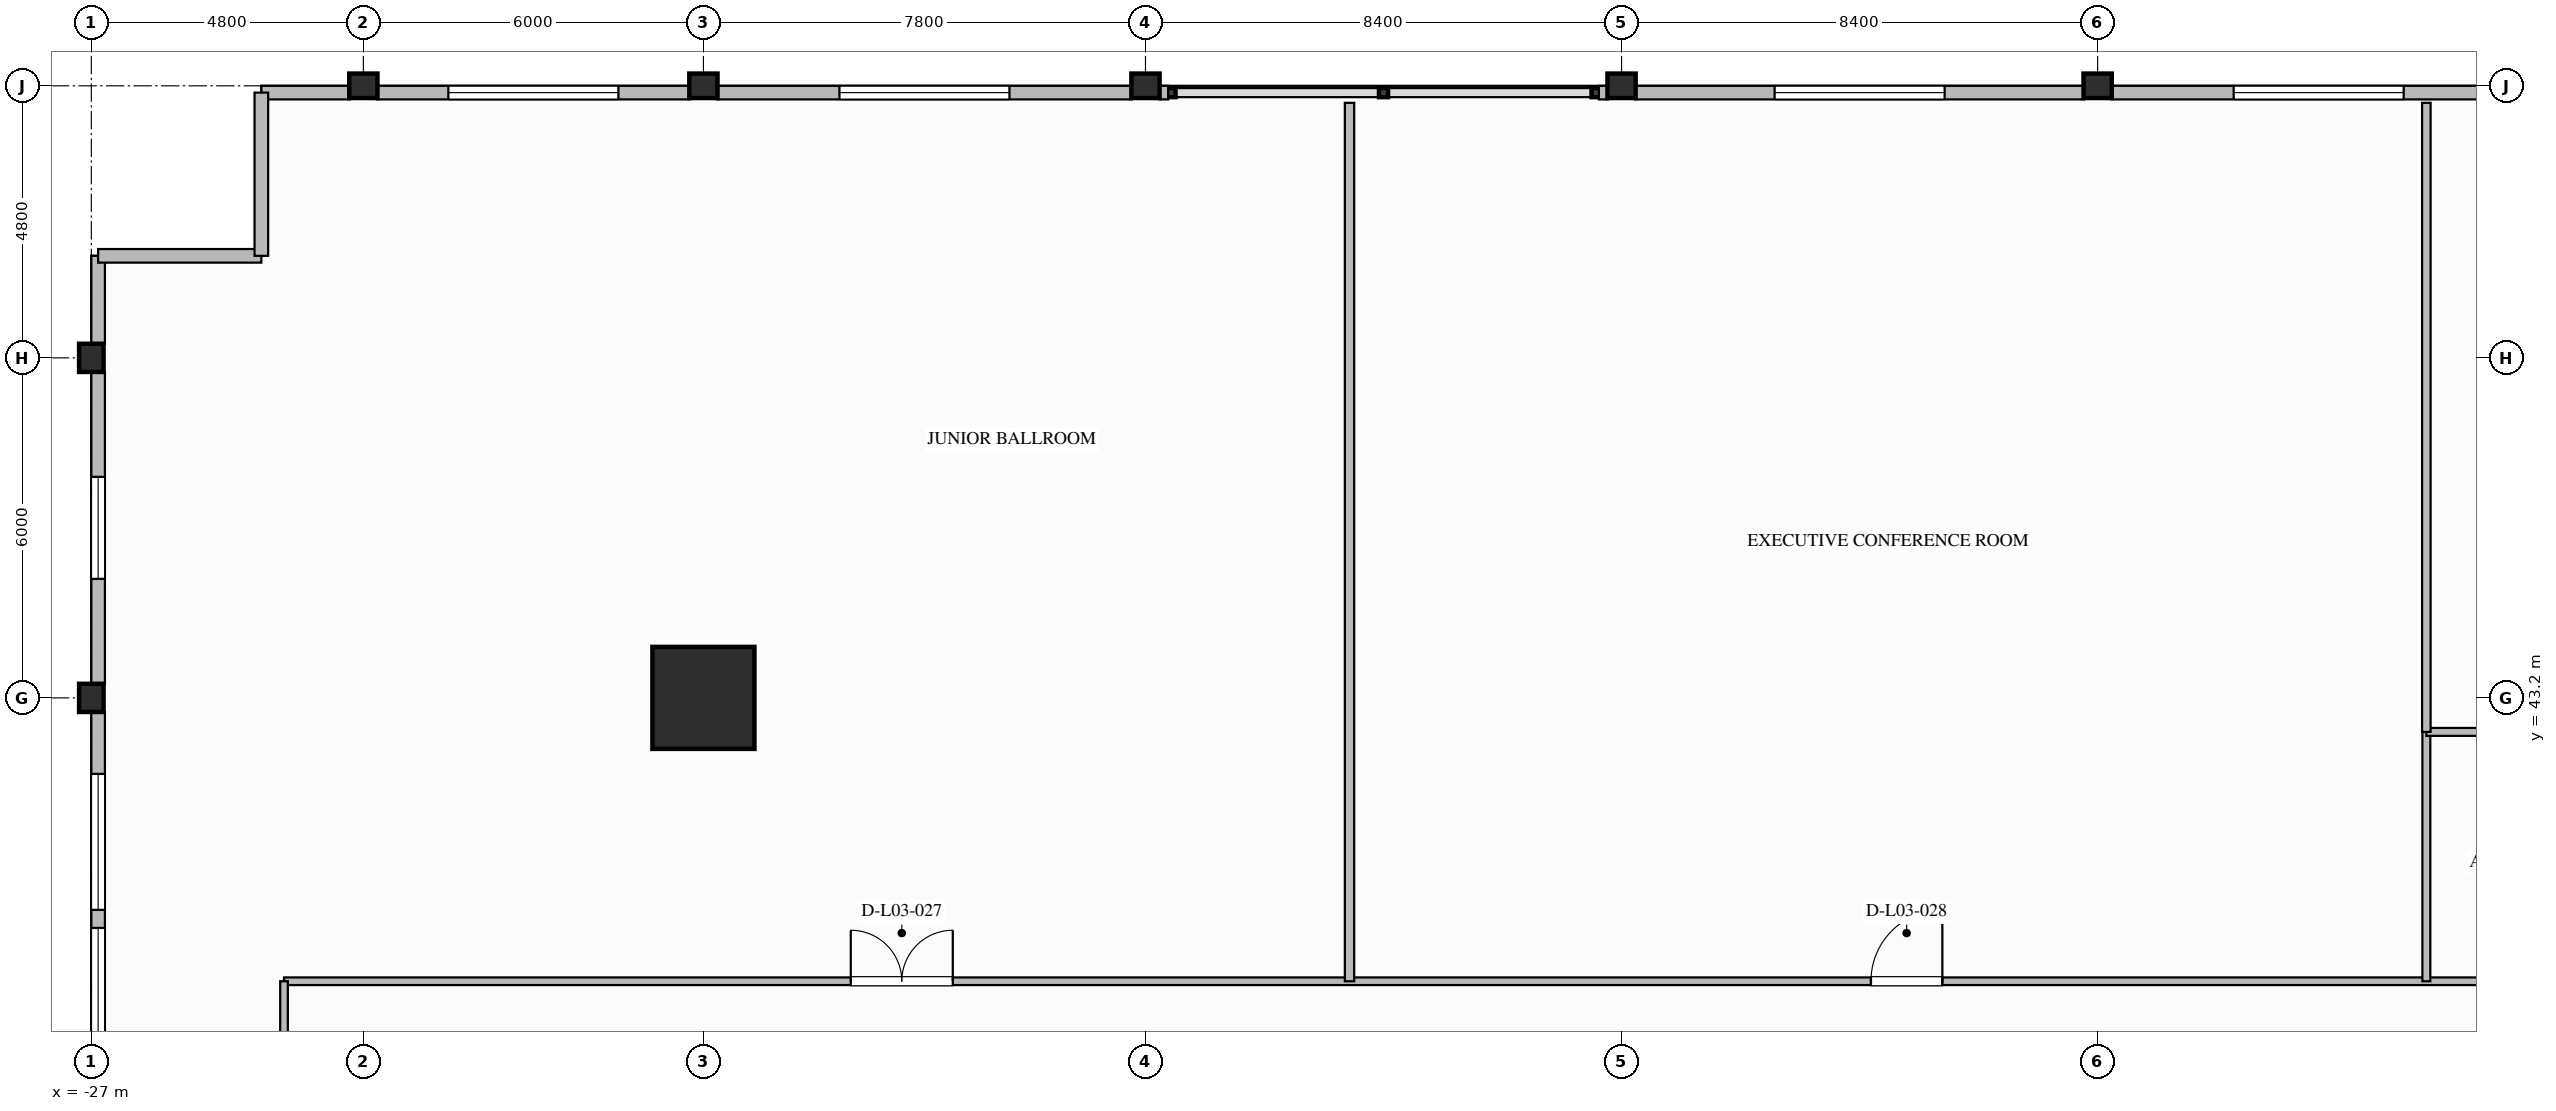
"""IFC4 building model, lengths in metres.
Left out: names, types, materials, properties, quantities, classifications, styles, units other than length and angle.
Written with IfcOpenShell. Run it as: python <this file> out.ifc"""

import sys

from ifc_helpers import new_model, si_unit, direction, frame, frame_2d, origin, origin_2d, place, context, subcontext, project, spatial, rectangle, i_section, extrude, element, fill, save


model = new_model("IFC4")
c1 = context("Model", 3, precision=1e-05, world=origin(), true_north=direction((0.0, 1.0)))
c2 = subcontext(c1, "Body", "Model", "MODEL_VIEW")
j1 = project(units=[si_unit("LENGTHUNIT", "METRE"), si_unit("PLANEANGLEUNIT", "RADIAN")], contexts=[c1])
p1 = place(None, origin())
s1 = spatial("IfcSite", under=j1, at=p1, CompositionType="ELEMENT")
p2 = place(p1, origin())
s2 = spatial("IfcBuilding", under=s1, at=p2, CompositionType="ELEMENT")
p3 = place(p2, frame((0.0, 0.0, 17.2)))
s3 = spatial("IfcBuildingStorey", under=s2, at=p3, CompositionType="ELEMENT", Elevation=17.2)
p4 = place(p3, frame((-16.2, 43.2, 0.0), z_axis=(0.0, 0.0, 1.0), x_axis=(1.0, 0.0, 0.0)))
e1 = element("IfcColumn", 1, at=p4, inside=s3, PredefinedType="COLUMN", context=c2, shape_type="SweptSolid", body=[
    extrude(rectangle(XDim=1.8, YDim=1.8, at=origin_2d()), origin(), (0.0, 0.0, 1.0), 5.2),
])
for number, where, z_axis, x_axis in (
    (2, (-27.0, 43.2, 0.0), (0.0, 0.0, 1.0), (1.0, 0.0, 0.0)),
    (3, (-27.0, 49.2, 0.0), (0.0, 0.0, 1.0), (1.0, 0.0, 0.0)),
    (4, (-22.2, 54.0, 0.0), (0.0, 0.0, 1.0), (0.0, 1.0, 0.0)),
    (5, (-16.2, 54.0, 0.0), (0.0, 0.0, 1.0), (0.0, 1.0, 0.0)),
    (6, (-8.4, 54.0, 0.0), (0.0, 0.0, 1.0), (0.0, 1.0, 0.0)),
    (7, (0.0, 54.0, 0.0), (0.0, 0.0, 1.0), (0.0, 1.0, 0.0)),
    (8, (8.4, 54.0, 0.0), (0.0, 0.0, 1.0), (0.0, 1.0, 0.0)),
):
    element("IfcColumn", number, at=place(p3, frame(where, z_axis=z_axis, x_axis=x_axis)), inside=s3, PredefinedType="COLUMN", context=c2, shape_type="SweptSolid", body=[
        extrude(i_section(OverallWidth=0.432, OverallDepth=0.498, WebThickness=0.056, FlangeThickness=0.089, FilletRadius=0.03, at=origin_2d()), origin(), (0.0, 0.0, 1.0), 5.2),
    ])
p5 = place(p3, frame((-26.88, 35.641, 0.0), z_axis=(0.0, 0.0, 1.0), x_axis=(0.0, 1.0, 0.0)))
e9 = element("IfcWall", 9, at=p5, inside=s3, PredefinedType="STANDARD", context=c2, shape_type="SweptSolid", body=[
    extrude(rectangle(XDim=7.318, YDim=0.24, at=frame_2d((3.659, 0.0))), origin(), (0.0, 0.0, 1.0), 4.205),
])
p6 = place(p5, frame((1.1, 0.0, 0.7)))
e10 = element("IfcOpeningElement", 10, at=p6, cuts=e9, PredefinedType="OPENING", context=c2, shape_type="SweptSolid", body=[
    extrude(rectangle(XDim=2.4, YDim=2.4, at=frame_2d((1.2, 1.2))), frame((0.0, 0.13, 0.0), z_axis=(0.0, -1.0, 0.0), x_axis=(1.0, 0.0, 0.0)), (0.0, 0.0, 1.0), 0.26),
])
p7 = place(p5, frame((3.818, 0.0, 0.7)))
e11 = element("IfcOpeningElement", 11, at=p7, cuts=e9, PredefinedType="OPENING", context=c2, shape_type="SweptSolid", body=[
    extrude(rectangle(XDim=2.4, YDim=2.4, at=frame_2d((1.2, 1.2))), frame((0.0, 0.13, 0.0), z_axis=(0.0, -1.0, 0.0), x_axis=(1.0, 0.0, 0.0)), (0.0, 0.0, 1.0), 0.26),
])
p8 = place(p3, frame((-26.88, 43.441, 0.0), z_axis=(0.0, 0.0, 1.0), x_axis=(0.0, 1.0, 0.0)))
e12 = element("IfcWall", 12, at=p8, inside=s3, PredefinedType="STANDARD", context=c2, shape_type="SweptSolid", body=[
    extrude(rectangle(XDim=5.518, YDim=0.24, at=frame_2d((2.759, 0.0))), origin(), (0.0, 0.0, 1.0), 4.205),
])
p9 = place(p8, frame((1.859, 0.0, 0.7)))
e13 = element("IfcOpeningElement", 13, at=p9, cuts=e12, PredefinedType="OPENING", context=c2, shape_type="SweptSolid", body=[
    extrude(rectangle(XDim=1.8, YDim=2.2, at=frame_2d((0.9, 1.1))), frame((0.0, 0.13, 0.0), z_axis=(0.0, -1.0, 0.0), x_axis=(1.0, 0.0, 0.0)), (0.0, 0.0, 1.0), 0.26),
])
for number, where, z_axis, x_axis in (
    (14, (-26.88, 49.441, 0.0), (0.0, 0.0, 1.0), (0.0, 1.0, 0.0)),
    (15, (-24.0, 53.88, 0.0), (0.0, 0.0, 1.0), (1.0, 0.0, 0.0)),
):
    element("IfcWall", number, at=place(p3, frame(where, z_axis=z_axis, x_axis=x_axis)), inside=s3, PredefinedType="STANDARD", context=c2, shape_type="SweptSolid", body=[
        extrude(rectangle(XDim=1.559, YDim=0.24, at=frame_2d((0.78, 0.0))), origin(), (0.0, 0.0, 1.0), 4.9),
    ])
p10 = place(p3, frame((-21.959, 53.88, 0.0), z_axis=(0.0, 0.0, 1.0), x_axis=(1.0, 0.0, 0.0)))
e16 = element("IfcWall", 16, at=p10, inside=s3, PredefinedType="STANDARD", context=c2, shape_type="SweptSolid", body=[
    extrude(rectangle(XDim=5.518, YDim=0.24, at=frame_2d((2.759, 0.0))), origin(), (0.0, 0.0, 1.0), 4.205),
])
p11 = place(p10, frame((1.259, 0.0, 0.65)))
e17 = element("IfcOpeningElement", 17, at=p11, cuts=e16, PredefinedType="OPENING", context=c2, shape_type="SweptSolid", body=[
    extrude(rectangle(XDim=3.0, YDim=2.2, at=frame_2d((1.5, 1.1))), frame((0.0, 0.13, 0.0), z_axis=(0.0, -1.0, 0.0), x_axis=(1.0, 0.0, 0.0)), (0.0, 0.0, 1.0), 0.26),
])
p12 = place(p3, frame((-15.959, 53.88, 0.0), z_axis=(0.0, 0.0, 1.0), x_axis=(1.0, 0.0, 0.0)))
e18 = element("IfcWall", 18, at=p12, inside=s3, PredefinedType="STANDARD", context=c2, shape_type="SweptSolid", body=[
    extrude(rectangle(XDim=7.318, YDim=0.24, at=frame_2d((3.659, 0.0))), origin(), (0.0, 0.0, 1.0), 4.205),
])
p13 = place(p12, frame((2.159, 0.0, 0.65)))
e19 = element("IfcOpeningElement", 19, at=p13, cuts=e18, PredefinedType="OPENING", context=c2, shape_type="SweptSolid", body=[
    extrude(rectangle(XDim=3.0, YDim=2.2, at=frame_2d((1.5, 1.1))), frame((0.0, 0.13, 0.0), z_axis=(0.0, -1.0, 0.0), x_axis=(1.0, 0.0, 0.0)), (0.0, 0.0, 1.0), 0.26),
])
p14 = place(p3, frame((-8.159, 53.88, 0.0), z_axis=(0.0, 0.0, 1.0), x_axis=(1.0, 0.0, 0.0)))
e20 = element("IfcWall", 20, at=p14, inside=s3, PredefinedType="STANDARD", context=c2, shape_type="SweptSolid", body=[
    extrude(rectangle(XDim=0.159, YDim=0.24, at=frame_2d((0.08, 0.0))), origin(), (0.0, 0.0, 1.0), 4.9),
])
p15 = place(p3, frame((-0.4, 53.88, 0.0), z_axis=(0.0, 0.0, 1.0), x_axis=(1.0, 0.0, 0.0)))
e21 = element("IfcWall", 21, at=p15, inside=s3, PredefinedType="STANDARD", context=c2, shape_type="SweptSolid", body=[
    extrude(rectangle(XDim=0.159, YDim=0.24, at=frame_2d((0.08, 0.0))), origin(), (0.0, 0.0, 1.0), 4.9),
])
p16 = place(p3, frame((0.241, 53.88, 0.0), z_axis=(0.0, 0.0, 1.0), x_axis=(1.0, 0.0, 0.0)))
e22 = element("IfcWall", 22, at=p16, inside=s3, PredefinedType="STANDARD", context=c2, shape_type="SweptSolid", body=[
    extrude(rectangle(XDim=7.918, YDim=0.24, at=frame_2d((3.959, 0.0))), origin(), (0.0, 0.0, 1.0), 4.205),
])
p17 = place(p16, frame((2.459, 0.0, 0.65)))
e23 = element("IfcOpeningElement", 23, at=p17, cuts=e22, PredefinedType="OPENING", context=c2, shape_type="SweptSolid", body=[
    extrude(rectangle(XDim=3.0, YDim=2.2, at=frame_2d((1.5, 1.1))), frame((0.0, 0.13, 0.0), z_axis=(0.0, -1.0, 0.0), x_axis=(1.0, 0.0, 0.0)), (0.0, 0.0, 1.0), 0.26),
])
p18 = place(p3, frame((8.641, 53.88, 0.0), z_axis=(0.0, 0.0, 1.0), x_axis=(1.0, 0.0, 0.0)))
e24 = element("IfcWall", 24, at=p18, inside=s3, PredefinedType="STANDARD", context=c2, shape_type="SweptSolid", body=[
    extrude(rectangle(XDim=7.318, YDim=0.24, at=frame_2d((3.659, 0.0))), origin(), (0.0, 0.0, 1.0), 4.205),
])
p19 = place(p18, frame((2.159, 0.0, 0.65)))
e25 = element("IfcOpeningElement", 25, at=p19, cuts=e24, PredefinedType="OPENING", context=c2, shape_type="SweptSolid", body=[
    extrude(rectangle(XDim=3.0, YDim=2.2, at=frame_2d((1.5, 1.1))), frame((0.0, 0.13, 0.0), z_axis=(0.0, -1.0, 0.0), x_axis=(1.0, 0.0, 0.0)), (0.0, 0.0, 1.0), 0.26),
])
for number, where, z_axis, x_axis in (
    (26, (-26.88, 51.0, 0.0), (0.0, 0.0, 1.0), (1.0, 0.0, 0.0)),
    (27, (-24.0, 51.0, 0.0), (0.0, 0.0, 1.0), (0.0, 1.0, 0.0)),
):
    element("IfcWall", number, at=place(p3, frame(where, z_axis=z_axis, x_axis=x_axis)), inside=s3, PredefinedType="STANDARD", context=c2, shape_type="SweptSolid", body=[
        extrude(rectangle(XDim=2.88, YDim=0.24, at=frame_2d((1.44, 0.0))), origin(), (0.0, 0.0, 1.0), 4.9),
    ])
p20 = place(p3, frame((-23.6, 38.2, 0.0), z_axis=(0.0, 0.0, 1.0), x_axis=(1.0, 0.0, 0.0)))
e28 = element("IfcWall", 28, at=p20, inside=s3, PredefinedType="PARTITIONING", context=c2, shape_type="SweptSolid", body=[
    extrude(rectangle(XDim=47.3, YDim=0.135, at=frame_2d((23.65, 0.0))), origin(), (0.0, 0.0, 1.0), 4.9),
])
p21 = place(p20, frame((39.2, 0.0, 0.0)))
e29 = element("IfcOpeningElement", 29, at=p21, cuts=e28, PredefinedType="OPENING", context=c2, shape_type="SweptSolid", body=[
    extrude(rectangle(XDim=0.98, YDim=2.1, at=frame_2d((0.49, 1.05))), frame((0.0, 0.077, 0.0), z_axis=(0.0, -1.0, 0.0), x_axis=(1.0, 0.0, 0.0)), (0.0, 0.0, 1.0), 0.155),
])
p22 = place(p20, frame((44.0, 0.0, 0.0)))
e30 = element("IfcOpeningElement", 30, at=p22, cuts=e28, PredefinedType="OPENING", context=c2, shape_type="SweptSolid", body=[
    extrude(rectangle(XDim=0.92, YDim=2.1, at=frame_2d((0.46, 1.05))), frame((0.0, 0.077, 0.0), z_axis=(0.0, -1.0, 0.0), x_axis=(1.0, 0.0, 0.0)), (0.0, 0.0, 1.0), 0.155),
])
p23 = place(p20, frame((10.0, 0.0, 0.0)))
e31 = element("IfcOpeningElement", 31, at=p23, cuts=e28, PredefinedType="OPENING", context=c2, shape_type="SweptSolid", body=[
    extrude(rectangle(XDim=1.8, YDim=2.35, at=frame_2d((0.9, 1.175))), frame((0.0, 0.077, 0.0), z_axis=(0.0, -1.0, 0.0), x_axis=(1.0, 0.0, 0.0)), (0.0, 0.0, 1.0), 0.155),
])
p24 = place(p20, frame((28.0, 0.0, 0.0)))
e32 = element("IfcOpeningElement", 32, at=p24, cuts=e28, PredefinedType="OPENING", context=c2, shape_type="SweptSolid", body=[
    extrude(rectangle(XDim=1.26, YDim=2.2, at=frame_2d((0.63, 1.1))), frame((0.0, 0.077, 0.0), z_axis=(0.0, -1.0, 0.0), x_axis=(1.0, 0.0, 0.0)), (0.0, 0.0, 1.0), 0.155),
])
p25 = place(p3, frame((-23.6, 0.3, 0.0), z_axis=(0.0, 0.0, 1.0), x_axis=(0.0, 1.0, 0.0)))
e33 = element("IfcWall", 33, at=p25, inside=s3, PredefinedType="PARTITIONING", context=c2, shape_type="SweptSolid", body=[
    extrude(rectangle(XDim=37.9, YDim=0.135, at=frame_2d((18.95, 0.0))), origin(), (0.0, 0.0, 1.0), 4.9),
])
p26 = place(p25, frame((9.0, 0.0, 0.0)))
e34 = element("IfcOpeningElement", 34, at=p26, cuts=e33, PredefinedType="OPENING", context=c2, shape_type="SweptSolid", body=[
    extrude(rectangle(XDim=1.08, YDim=2.04, at=frame_2d((0.54, 1.02))), frame((0.0, 0.077, 0.0), z_axis=(0.0, -1.0, 0.0), x_axis=(1.0, 0.0, 0.0)), (0.0, 0.0, 1.0), 0.155),
])
p27 = place(p3, frame((14.2, 38.2, 0.0), z_axis=(0.0, 0.0, 1.0), x_axis=(0.0, 1.0, 0.0)))
e35 = element("IfcWall", 35, at=p27, inside=s3, PredefinedType="PLUMBINGWALL", context=c2, shape_type="SweptSolid", body=[
    extrude(rectangle(XDim=4.4, YDim=0.14, at=frame_2d((2.2, 0.0))), origin(), (0.0, 0.0, 1.0), 4.9),
])
p28 = place(p3, frame((14.2, 42.6, 0.0), z_axis=(0.0, 0.0, 1.0), x_axis=(1.0, 0.0, 0.0)))
e36 = element("IfcWall", 36, at=p28, inside=s3, PredefinedType="PLUMBINGWALL", context=c2, shape_type="SweptSolid", body=[
    extrude(rectangle(XDim=9.5, YDim=0.14, at=frame_2d((4.75, 0.0))), origin(), (0.0, 0.0, 1.0), 4.9),
])
p29 = place(p3, frame((14.2, 42.6, 0.0), z_axis=(0.0, 0.0, 1.0), x_axis=(0.0, 1.0, 0.0)))
e37 = element("IfcWall", 37, at=p29, inside=s3, PredefinedType="PARTITIONING", context=c2, shape_type="SweptSolid", body=[
    extrude(rectangle(XDim=11.1, YDim=0.15, at=frame_2d((5.55, 0.0))), origin(), (0.0, 0.0, 1.0), 4.9),
])
p30 = place(p3, frame((-4.8, 38.2, 0.0), z_axis=(0.0, 0.0, 1.0), x_axis=(0.0, 1.0, 0.0)))
e38 = element("IfcWall", 38, at=p30, inside=s3, PredefinedType="PARTITIONING", context=c2, shape_type="SweptSolid", body=[
    extrude(rectangle(XDim=15.5, YDim=0.165, at=frame_2d((7.75, 0.0))), origin(), (0.0, 0.0, 1.0), 4.9),
])
p31 = place(p6, origin())
e39 = element("IfcWindow", 39, at=p31, inside=s3, PartitioningType="SINGLE_PANEL", PredefinedType="WINDOW", context=c2, shape_type="SweptSolid", body=[
    extrude(rectangle(XDim=2.4, YDim=2.4, at=frame_2d((1.2, 1.2))), frame((0.0, 0.03, 0.0), z_axis=(0.0, -1.0, 0.0), x_axis=(1.0, 0.0, 0.0)), (0.0, 0.0, 1.0), 0.06),
])
fill(e10, e39)
p32 = place(p7, origin())
e40 = element("IfcWindow", 40, at=p32, inside=s3, PartitioningType="SINGLE_PANEL", PredefinedType="WINDOW", context=c2, shape_type="SweptSolid", body=[
    extrude(rectangle(XDim=2.4, YDim=2.4, at=frame_2d((1.2, 1.2))), frame((0.0, 0.03, 0.0), z_axis=(0.0, -1.0, 0.0), x_axis=(1.0, 0.0, 0.0)), (0.0, 0.0, 1.0), 0.06),
])
fill(e11, e40)
p33 = place(p9, origin())
e41 = element("IfcWindow", 41, at=p33, inside=s3, PartitioningType="SINGLE_PANEL", PredefinedType="WINDOW", context=c2, shape_type="SweptSolid", body=[
    extrude(rectangle(XDim=1.8, YDim=2.2, at=frame_2d((0.9, 1.1))), frame((0.0, 0.03, 0.0), z_axis=(0.0, -1.0, 0.0), x_axis=(1.0, 0.0, 0.0)), (0.0, 0.0, 1.0), 0.06),
])
fill(e13, e41)
p34 = place(p11, origin())
e42 = element("IfcWindow", 42, at=p34, inside=s3, PartitioningType="SINGLE_PANEL", PredefinedType="WINDOW", context=c2, shape_type="SweptSolid", body=[
    extrude(rectangle(XDim=3.0, YDim=2.2, at=frame_2d((1.5, 1.1))), frame((0.0, 0.03, 0.0), z_axis=(0.0, -1.0, 0.0), x_axis=(1.0, 0.0, 0.0)), (0.0, 0.0, 1.0), 0.06),
])
fill(e17, e42)
p35 = place(p13, origin())
e43 = element("IfcWindow", 43, at=p35, inside=s3, PartitioningType="SINGLE_PANEL", PredefinedType="WINDOW", context=c2, shape_type="SweptSolid", body=[
    extrude(rectangle(XDim=3.0, YDim=2.2, at=frame_2d((1.5, 1.1))), frame((0.0, 0.03, 0.0), z_axis=(0.0, -1.0, 0.0), x_axis=(1.0, 0.0, 0.0)), (0.0, 0.0, 1.0), 0.06),
])
fill(e19, e43)
p36 = place(p17, origin())
e44 = element("IfcWindow", 44, at=p36, inside=s3, PartitioningType="SINGLE_PANEL", PredefinedType="WINDOW", context=c2, shape_type="SweptSolid", body=[
    extrude(rectangle(XDim=3.0, YDim=2.2, at=frame_2d((1.5, 1.1))), frame((0.0, 0.03, 0.0), z_axis=(0.0, -1.0, 0.0), x_axis=(1.0, 0.0, 0.0)), (0.0, 0.0, 1.0), 0.06),
])
fill(e23, e44)
p37 = place(p19, origin())
e45 = element("IfcWindow", 45, at=p37, inside=s3, PartitioningType="SINGLE_PANEL", PredefinedType="WINDOW", context=c2, shape_type="SweptSolid", body=[
    extrude(rectangle(XDim=3.0, YDim=2.2, at=frame_2d((1.5, 1.1))), frame((0.0, 0.03, 0.0), z_axis=(0.0, -1.0, 0.0), x_axis=(1.0, 0.0, 0.0)), (0.0, 0.0, 1.0), 0.06),
])
fill(e25, e45)
p38 = place(p23, origin())
e46 = element("IfcDoor", 46, at=p38, inside=s3, OperationType="DOUBLE_DOOR_SINGLE_SWING", PredefinedType="DOOR", context=c2, shape_type="SweptSolid", body=[
    extrude(rectangle(XDim=1.8, YDim=2.35, at=frame_2d((0.9, 1.175))), frame((0.0, 0.025, 0.0), z_axis=(0.0, -1.0, 0.0), x_axis=(1.0, 0.0, 0.0)), (0.0, 0.0, 1.0), 0.05),
])
fill(e31, e46)
p39 = place(p24, origin())
e47 = element("IfcDoor", 47, at=p39, inside=s3, OperationType="SINGLE_SWING_RIGHT", PredefinedType="DOOR", context=c2, shape_type="SweptSolid", body=[
    extrude(rectangle(XDim=1.26, YDim=2.2, at=frame_2d((0.63, 1.1))), frame((0.0, 0.025, 0.0), z_axis=(0.0, -1.0, 0.0), x_axis=(1.0, 0.0, 0.0)), (0.0, 0.0, 1.0), 0.05),
])
fill(e32, e47)
save(model, sys.argv[1])
